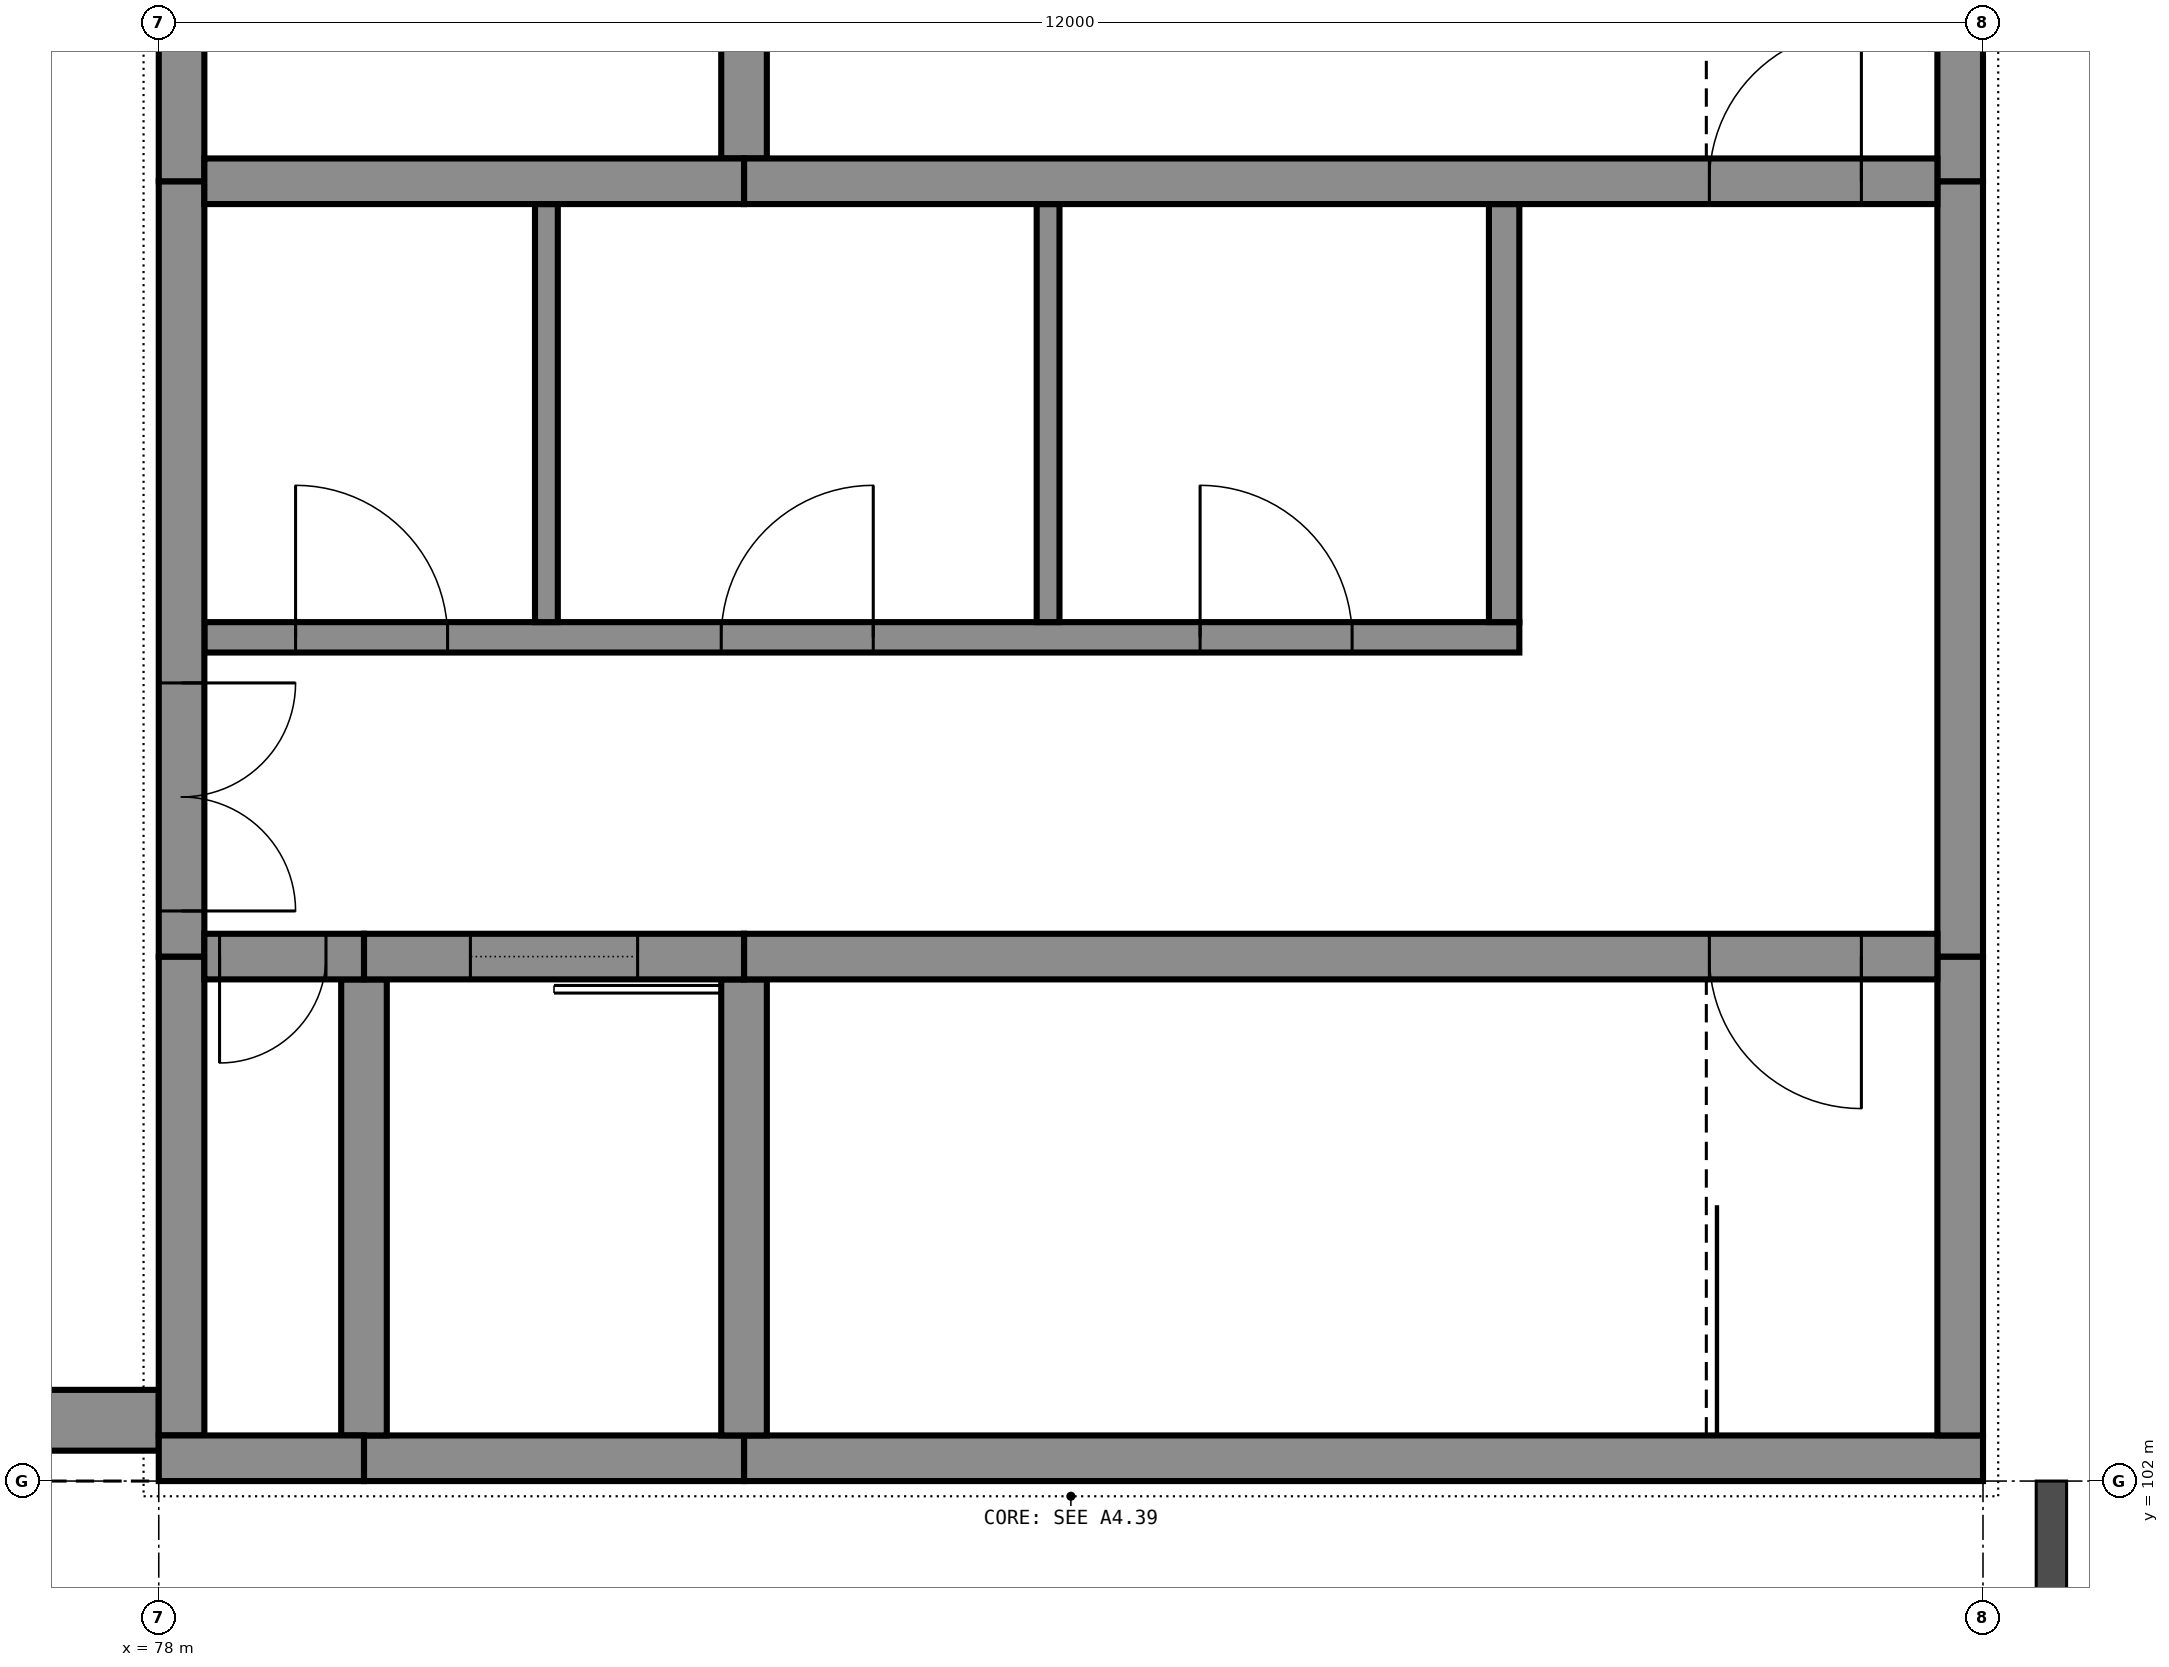
"""IFC4 building model, lengths in metres.
Left out: names, types, materials, properties, quantities, classifications, styles, units other than length and angle.
Written with IfcOpenShell. Run it as: python <this file> out.ifc"""

import sys

from ifc_helpers import new_model, si_unit, direction, frame, frame_2d, origin, place, context, subcontext, project, spatial, rectangle, extrude, element, fill, save


model = new_model("IFC4")
c1 = context("Model", 3, precision=1e-05, world=origin(), true_north=direction((0.0, 1.0)))
c2 = subcontext(c1, "Body", "Model", "MODEL_VIEW")
j1 = project(units=[si_unit("LENGTHUNIT", "METRE"), si_unit("PLANEANGLEUNIT", "RADIAN")], contexts=[c1])
p1 = place(None, origin())
s1 = spatial("IfcSite", under=j1, at=p1, CompositionType="ELEMENT")
p2 = place(p1, origin())
s2 = spatial("IfcBuilding", under=s1, at=p2, CompositionType="ELEMENT")
p3 = place(p2, frame((0.0, 0.0, 12.0)))
s3 = spatial("IfcBuildingStorey", under=s2, at=p3, CompositionType="ELEMENT", Elevation=12.0)
p4 = place(p3, frame((90.0, 102.15, 0.0), z_axis=(0.0, 0.0, 1.0), x_axis=(-1.0, 0.0, 0.0)))
e1 = element("IfcWall", 1, at=p4, inside=s3, PredefinedType="SHEAR", context=c2, shape_type="SweptSolid", body=[
    extrude(rectangle(XDim=8.15, YDim=0.3, at=frame_2d((4.075, 0.0))), origin(), (0.0, 0.0, 1.0), 5.0),
])
p5 = place(p3, frame((81.85, 102.15, 0.0), z_axis=(0.0, 0.0, 1.0), x_axis=(-1.0, 0.0, 0.0)))
e2 = element("IfcWall", 2, at=p5, inside=s3, PredefinedType="SHEAR", context=c2, shape_type="SweptSolid", body=[
    extrude(rectangle(XDim=2.5, YDim=0.3, at=frame_2d((1.25, 0.0))), origin(), (0.0, 0.0, 1.0), 5.0),
])
p6 = place(p3, frame((79.35, 102.15, 0.0), z_axis=(0.0, 0.0, 1.0), x_axis=(-1.0, 0.0, 0.0)))
e3 = element("IfcWall", 3, at=p6, inside=s3, PredefinedType="SHEAR", context=c2, shape_type="SweptSolid", body=[
    extrude(rectangle(XDim=1.35, YDim=0.3, at=frame_2d((0.675, 0.0))), origin(), (0.0, 0.0, 1.0), 5.0),
])
p7 = place(p3, frame((89.7, 105.45, 0.0), z_axis=(0.0, 0.0, 1.0), x_axis=(-1.0, 0.0, 0.0)))
e4 = element("IfcWall", 4, at=p7, inside=s3, PredefinedType="SHEAR", context=c2, shape_type="SweptSolid", body=[
    extrude(rectangle(XDim=7.85, YDim=0.3, at=frame_2d((3.925, 0.0))), origin(), (0.0, 0.0, 1.0), 5.0),
])
p8 = place(p7, frame((0.5, 0.0, 0.0)))
e5 = element("IfcOpeningElement", 5, at=p8, cuts=e4, PredefinedType="OPENING", context=c2, shape_type="SweptSolid", body=[
    extrude(rectangle(XDim=1.0, YDim=2.1, at=frame_2d((0.5, 1.05))), frame((0.0, 0.16, 0.0), z_axis=(0.0, -1.0, 0.0), x_axis=(1.0, 0.0, 0.0)), (0.0, 0.0, 1.0), 0.32),
])
p9 = place(p3, frame((81.85, 105.45, 0.0), z_axis=(0.0, 0.0, 1.0), x_axis=(-1.0, 0.0, 0.0)))
e6 = element("IfcWall", 6, at=p9, inside=s3, PredefinedType="SHEAR", context=c2, shape_type="SweptSolid", body=[
    extrude(rectangle(XDim=2.5, YDim=0.3, at=frame_2d((1.25, 0.0))), origin(), (0.0, 0.0, 1.0), 5.0),
])
p10 = place(p9, frame((0.7, 0.0, 0.0)))
e7 = element("IfcOpeningElement", 7, at=p10, cuts=e6, PredefinedType="OPENING", context=c2, shape_type="SweptSolid", body=[
    extrude(rectangle(XDim=1.1, YDim=2.1, at=frame_2d((0.55, 1.05))), frame((0.0, 0.16, 0.0), z_axis=(0.0, -1.0, 0.0), x_axis=(1.0, 0.0, 0.0)), (0.0, 0.0, 1.0), 0.32),
])
p11 = place(p3, frame((79.35, 105.45, 0.0), z_axis=(0.0, 0.0, 1.0), x_axis=(-1.0, 0.0, 0.0)))
e8 = element("IfcWall", 8, at=p11, inside=s3, PredefinedType="SHEAR", context=c2, shape_type="SweptSolid", body=[
    extrude(rectangle(XDim=1.05, YDim=0.3, at=frame_2d((0.525, 0.0))), origin(), (0.0, 0.0, 1.0), 5.0),
])
p12 = place(p11, frame((0.25, 0.0, 0.0)))
e9 = element("IfcOpeningElement", 9, at=p12, cuts=e8, PredefinedType="OPENING", context=c2, shape_type="SweptSolid", body=[
    extrude(rectangle(XDim=0.7, YDim=2.1, at=frame_2d((0.35, 1.05))), frame((0.0, 0.16, 0.0), z_axis=(0.0, -1.0, 0.0), x_axis=(1.0, 0.0, 0.0)), (0.0, 0.0, 1.0), 0.32),
])
p13 = place(p3, frame((89.7, 110.55, 0.0), z_axis=(0.0, 0.0, 1.0), x_axis=(-1.0, 0.0, 0.0)))
e10 = element("IfcWall", 10, at=p13, inside=s3, PredefinedType="SHEAR", context=c2, shape_type="SweptSolid", body=[
    extrude(rectangle(XDim=7.85, YDim=0.3, at=frame_2d((3.925, 0.0))), origin(), (0.0, 0.0, 1.0), 5.0),
])
p14 = place(p13, frame((0.5, 0.0, 0.0)))
e11 = element("IfcOpeningElement", 11, at=p14, cuts=e10, PredefinedType="OPENING", context=c2, shape_type="SweptSolid", body=[
    extrude(rectangle(XDim=1.0, YDim=2.1, at=frame_2d((0.5, 1.05))), frame((0.0, 0.16, 0.0), z_axis=(0.0, -1.0, 0.0), x_axis=(1.0, 0.0, 0.0)), (0.0, 0.0, 1.0), 0.32),
])
p15 = place(p3, frame((81.85, 110.55, 0.0), z_axis=(0.0, 0.0, 1.0), x_axis=(-1.0, 0.0, 0.0)))
e12 = element("IfcWall", 12, at=p15, inside=s3, PredefinedType="SHEAR", context=c2, shape_type="SweptSolid", body=[
    extrude(rectangle(XDim=3.55, YDim=0.3, at=frame_2d((1.775, 0.0))), origin(), (0.0, 0.0, 1.0), 5.0),
])
p16 = place(p3, frame((89.85, 102.3, 0.0), z_axis=(0.0, 0.0, 1.0), x_axis=(0.0, 1.0, 0.0)))
e13 = element("IfcWall", 13, at=p16, inside=s3, PredefinedType="SHEAR", context=c2, shape_type="SweptSolid", body=[
    extrude(rectangle(XDim=3.15, YDim=0.3, at=frame_2d((1.575, 0.0))), origin(), (0.0, 0.0, 1.0), 5.0),
])
p17 = place(p3, frame((89.85, 105.45, 0.0), z_axis=(0.0, 0.0, 1.0), x_axis=(0.0, 1.0, 0.0)))
e14 = element("IfcWall", 14, at=p17, inside=s3, PredefinedType="SHEAR", context=c2, shape_type="SweptSolid", body=[
    extrude(rectangle(XDim=5.1, YDim=0.3, at=frame_2d((2.55, 0.0))), origin(), (0.0, 0.0, 1.0), 5.0),
])
p18 = place(p3, frame((89.85, 110.55, 0.0), z_axis=(0.0, 0.0, 1.0), x_axis=(0.0, 1.0, 0.0)))
e15 = element("IfcWall", 15, at=p18, inside=s3, PredefinedType="SHEAR", context=c2, shape_type="SweptSolid", body=[
    extrude(rectangle(XDim=3.45, YDim=0.3, at=frame_2d((1.725, 0.0))), origin(), (0.0, 0.0, 1.0), 5.0),
])
p19 = place(p3, frame((78.15, 102.3, 0.0), z_axis=(0.0, 0.0, 1.0), x_axis=(0.0, 1.0, 0.0)))
e16 = element("IfcWall", 16, at=p19, inside=s3, PredefinedType="SHEAR", context=c2, shape_type="SweptSolid", body=[
    extrude(rectangle(XDim=3.15, YDim=0.3, at=frame_2d((1.575, 0.0))), origin(), (0.0, 0.0, 1.0), 5.0),
])
p20 = place(p3, frame((78.15, 105.45, 0.0), z_axis=(0.0, 0.0, 1.0), x_axis=(0.0, 1.0, 0.0)))
e17 = element("IfcWall", 17, at=p20, inside=s3, PredefinedType="SHEAR", context=c2, shape_type="SweptSolid", body=[
    extrude(rectangle(XDim=5.1, YDim=0.3, at=frame_2d((2.55, 0.0))), origin(), (0.0, 0.0, 1.0), 5.0),
])
p21 = place(p20, frame((0.3, 0.0, 0.0)))
e18 = element("IfcOpeningElement", 18, at=p21, cuts=e17, PredefinedType="OPENING", context=c2, shape_type="SweptSolid", body=[
    extrude(rectangle(XDim=1.5, YDim=2.1, at=frame_2d((0.75, 1.05))), frame((0.0, 0.16, 0.0), z_axis=(0.0, -1.0, 0.0), x_axis=(1.0, 0.0, 0.0)), (0.0, 0.0, 1.0), 0.32),
])
p22 = place(p3, frame((78.15, 110.55, 0.0), z_axis=(0.0, 0.0, 1.0), x_axis=(0.0, 1.0, 0.0)))
e19 = element("IfcWall", 19, at=p22, inside=s3, PredefinedType="SHEAR", context=c2, shape_type="SweptSolid", body=[
    extrude(rectangle(XDim=3.15, YDim=0.3, at=frame_2d((1.575, 0.0))), origin(), (0.0, 0.0, 1.0), 5.0),
])
p23 = place(p22, frame((1.15, 0.0, 0.0)))
e20 = element("IfcOpeningElement", 20, at=p23, cuts=e19, PredefinedType="OPENING", context=c2, shape_type="SweptSolid", body=[
    extrude(rectangle(XDim=1.0, YDim=2.1, at=frame_2d((0.5, 1.05))), frame((0.0, 0.16, 0.0), z_axis=(0.0, -1.0, 0.0), x_axis=(1.0, 0.0, 0.0)), (0.0, 0.0, 1.0), 0.32),
])
p24 = place(p3, frame((81.85, 102.3, 0.0), z_axis=(0.0, 0.0, 1.0), x_axis=(0.0, 1.0, 0.0)))
e21 = element("IfcWall", 21, at=p24, inside=s3, PredefinedType="SHEAR", context=c2, shape_type="SweptSolid", body=[
    extrude(rectangle(XDim=3.0, YDim=0.3, at=frame_2d((1.5, 0.0))), origin(), (0.0, 0.0, 1.0), 5.0),
])
p25 = place(p3, frame((81.85, 110.7, 0.0), z_axis=(0.0, 0.0, 1.0), x_axis=(0.0, 1.0, 0.0)))
e22 = element("IfcWall", 22, at=p25, inside=s3, PredefinedType="SHEAR", context=c2, shape_type="SweptSolid", body=[
    extrude(rectangle(XDim=3.3, YDim=0.3, at=frame_2d((1.65, 0.0))), origin(), (0.0, 0.0, 1.0), 5.0),
])
p26 = place(p3, frame((79.35, 102.3, 0.0), z_axis=(0.0, 0.0, 1.0), x_axis=(0.0, 1.0, 0.0)))
e23 = element("IfcWall", 23, at=p26, inside=s3, PredefinedType="SHEAR", context=c2, shape_type="SweptSolid", body=[
    extrude(rectangle(XDim=3.0, YDim=0.3, at=frame_2d((1.5, 0.0))), origin(), (0.0, 0.0, 1.0), 5.0),
])
p27 = place(p3, frame((66.5, 102.4, 0.0), z_axis=(0.0, 0.0, 1.0), x_axis=(1.0, 0.0, 0.0)))
e24 = element("IfcWall", 24, at=p27, inside=s3, PredefinedType="SOLIDWALL", context=c2, shape_type="SweptSolid", body=[
    extrude(rectangle(XDim=11.5, YDim=0.4, at=frame_2d((5.75, 0.0))), origin(), (0.0, 0.0, 1.0), 5.0),
])
p28 = place(p3, frame((78.3, 107.55, 0.0), z_axis=(0.0, 0.0, 1.0), x_axis=(1.0, 0.0, 0.0)))
e25 = element("IfcWall", 25, at=p28, inside=s3, PredefinedType="PARTITIONING", context=c2, shape_type="SweptSolid", body=[
    extrude(rectangle(XDim=8.65, YDim=0.2, at=frame_2d((4.325, 0.0))), origin(), (0.0, 0.0, 1.0), 4.825),
])
p29 = place(p28, frame((0.6, 0.0, 0.0)))
e26 = element("IfcOpeningElement", 26, at=p29, cuts=e25, PredefinedType="OPENING", context=c2, shape_type="SweptSolid", body=[
    extrude(rectangle(XDim=1.0, YDim=2.1, at=frame_2d((0.5, 1.05))), frame((0.0, 0.11, 0.0), z_axis=(0.0, -1.0, 0.0), x_axis=(1.0, 0.0, 0.0)), (0.0, 0.0, 1.0), 0.22),
])
p30 = place(p28, frame((3.4, 0.0, 0.0)))
e27 = element("IfcOpeningElement", 27, at=p30, cuts=e25, PredefinedType="OPENING", context=c2, shape_type="SweptSolid", body=[
    extrude(rectangle(XDim=1.0, YDim=2.1, at=frame_2d((0.5, 1.05))), frame((0.0, 0.11, 0.0), z_axis=(0.0, -1.0, 0.0), x_axis=(1.0, 0.0, 0.0)), (0.0, 0.0, 1.0), 0.22),
])
p31 = place(p28, frame((6.55, 0.0, 0.0)))
e28 = element("IfcOpeningElement", 28, at=p31, cuts=e25, PredefinedType="OPENING", context=c2, shape_type="SweptSolid", body=[
    extrude(rectangle(XDim=1.0, YDim=2.1, at=frame_2d((0.5, 1.05))), frame((0.0, 0.11, 0.0), z_axis=(0.0, -1.0, 0.0), x_axis=(1.0, 0.0, 0.0)), (0.0, 0.0, 1.0), 0.22),
])
for number, where, z_axis, x_axis in (
    (29, (80.55, 107.65, 0.0), (0.0, 0.0, 1.0), (0.0, 1.0, 0.0)),
    (30, (83.85, 107.65, 0.0), (0.0, 0.0, 1.0), (0.0, 1.0, 0.0)),
):
    element("IfcWall", number, at=place(p3, frame(where, z_axis=z_axis, x_axis=x_axis)), inside=s3, PredefinedType="PARTITIONING", context=c2, shape_type="SweptSolid", body=[
        extrude(rectangle(XDim=2.75, YDim=0.15, at=frame_2d((1.375, 0.0))), origin(), (0.0, 0.0, 1.0), 4.825),
    ])
p32 = place(p3, frame((86.85, 107.65, 0.0), z_axis=(0.0, 0.0, 1.0), x_axis=(0.0, 1.0, 0.0)))
e31 = element("IfcWall", 31, at=p32, inside=s3, PredefinedType="PARTITIONING", context=c2, shape_type="SweptSolid", body=[
    extrude(rectangle(XDim=2.75, YDim=0.2, at=frame_2d((1.375, 0.0))), origin(), (0.0, 0.0, 1.0), 4.825),
])
p33 = place(p12, origin())
e32 = element("IfcDoor", 32, at=p33, inside=s3, OperationType="SINGLE_SWING_LEFT", PredefinedType="DOOR", context=c2, shape_type="SweptSolid", body=[
    extrude(rectangle(XDim=0.7, YDim=2.1, at=frame_2d((0.35, 1.05))), frame((0.0, 0.025, 0.0), z_axis=(0.0, -1.0, 0.0), x_axis=(1.0, 0.0, 0.0)), (0.0, 0.0, 1.0), 0.05),
])
fill(e9, e32)
p34 = place(p10, origin())
e33 = element("IfcDoor", 33, at=p34, inside=s3, OperationType="SLIDING_TO_LEFT", PredefinedType="DOOR", context=c2, shape_type="SweptSolid", body=[
    extrude(rectangle(XDim=1.1, YDim=2.1, at=frame_2d((0.55, 1.05))), frame((0.0, 0.025, 0.0), z_axis=(0.0, -1.0, 0.0), x_axis=(1.0, 0.0, 0.0)), (0.0, 0.0, 1.0), 0.05),
])
fill(e7, e33)
p35 = place(p8, origin())
e34 = element("IfcDoor", 34, at=p35, inside=s3, OperationType="SINGLE_SWING_RIGHT", PredefinedType="DOOR", context=c2, shape_type="SweptSolid", body=[
    extrude(rectangle(XDim=1.0, YDim=2.1, at=frame_2d((0.5, 1.05))), frame((0.0, 0.025, 0.0), z_axis=(0.0, -1.0, 0.0), x_axis=(1.0, 0.0, 0.0)), (0.0, 0.0, 1.0), 0.05),
])
fill(e5, e34)
p36 = place(p21, frame((1.5, 0.0, 0.0), z_axis=(0.0, 0.0, 1.0), x_axis=(-1.0, 0.0, 0.0)))
e35 = element("IfcDoor", 35, at=p36, inside=s3, OperationType="DOUBLE_DOOR_SINGLE_SWING", PredefinedType="DOOR", context=c2, shape_type="SweptSolid", body=[
    extrude(rectangle(XDim=1.5, YDim=2.1, at=frame_2d((0.75, 1.05))), frame((0.0, 0.025, 0.0), z_axis=(0.0, -1.0, 0.0), x_axis=(1.0, 0.0, 0.0)), (0.0, 0.0, 1.0), 0.05),
])
fill(e18, e35)
p37 = place(p29, origin())
e36 = element("IfcDoor", 36, at=p37, inside=s3, OperationType="SINGLE_SWING_RIGHT", PredefinedType="DOOR", context=c2, shape_type="SweptSolid", body=[
    extrude(rectangle(XDim=1.0, YDim=2.1, at=frame_2d((0.5, 1.05))), frame((0.0, 0.025, 0.0), z_axis=(0.0, -1.0, 0.0), x_axis=(1.0, 0.0, 0.0)), (0.0, 0.0, 1.0), 0.05),
])
fill(e26, e36)
p38 = place(p30, origin())
e37 = element("IfcDoor", 37, at=p38, inside=s3, OperationType="SINGLE_SWING_LEFT", PredefinedType="DOOR", context=c2, shape_type="SweptSolid", body=[
    extrude(rectangle(XDim=1.0, YDim=2.1, at=frame_2d((0.5, 1.05))), frame((0.0, 0.025, 0.0), z_axis=(0.0, -1.0, 0.0), x_axis=(1.0, 0.0, 0.0)), (0.0, 0.0, 1.0), 0.05),
])
fill(e27, e37)
p39 = place(p31, origin())
e38 = element("IfcDoor", 38, at=p39, inside=s3, OperationType="SINGLE_SWING_RIGHT", PredefinedType="DOOR", context=c2, shape_type="SweptSolid", body=[
    extrude(rectangle(XDim=1.0, YDim=2.1, at=frame_2d((0.5, 1.05))), frame((0.0, 0.025, 0.0), z_axis=(0.0, -1.0, 0.0), x_axis=(1.0, 0.0, 0.0)), (0.0, 0.0, 1.0), 0.05),
])
fill(e28, e38)
p40 = place(p14, frame((1.0, 0.0, 0.0), z_axis=(0.0, 0.0, 1.0), x_axis=(-1.0, 0.0, 0.0)))
e39 = element("IfcDoor", 39, at=p40, inside=s3, OperationType="SINGLE_SWING_LEFT", PredefinedType="DOOR", context=c2, shape_type="SweptSolid", body=[
    extrude(rectangle(XDim=1.0, YDim=2.1, at=frame_2d((0.5, 1.05))), frame((0.0, 0.025, 0.0), z_axis=(0.0, -1.0, 0.0), x_axis=(1.0, 0.0, 0.0)), (0.0, 0.0, 1.0), 0.05),
])
fill(e11, e39)
save(model, sys.argv[1])
